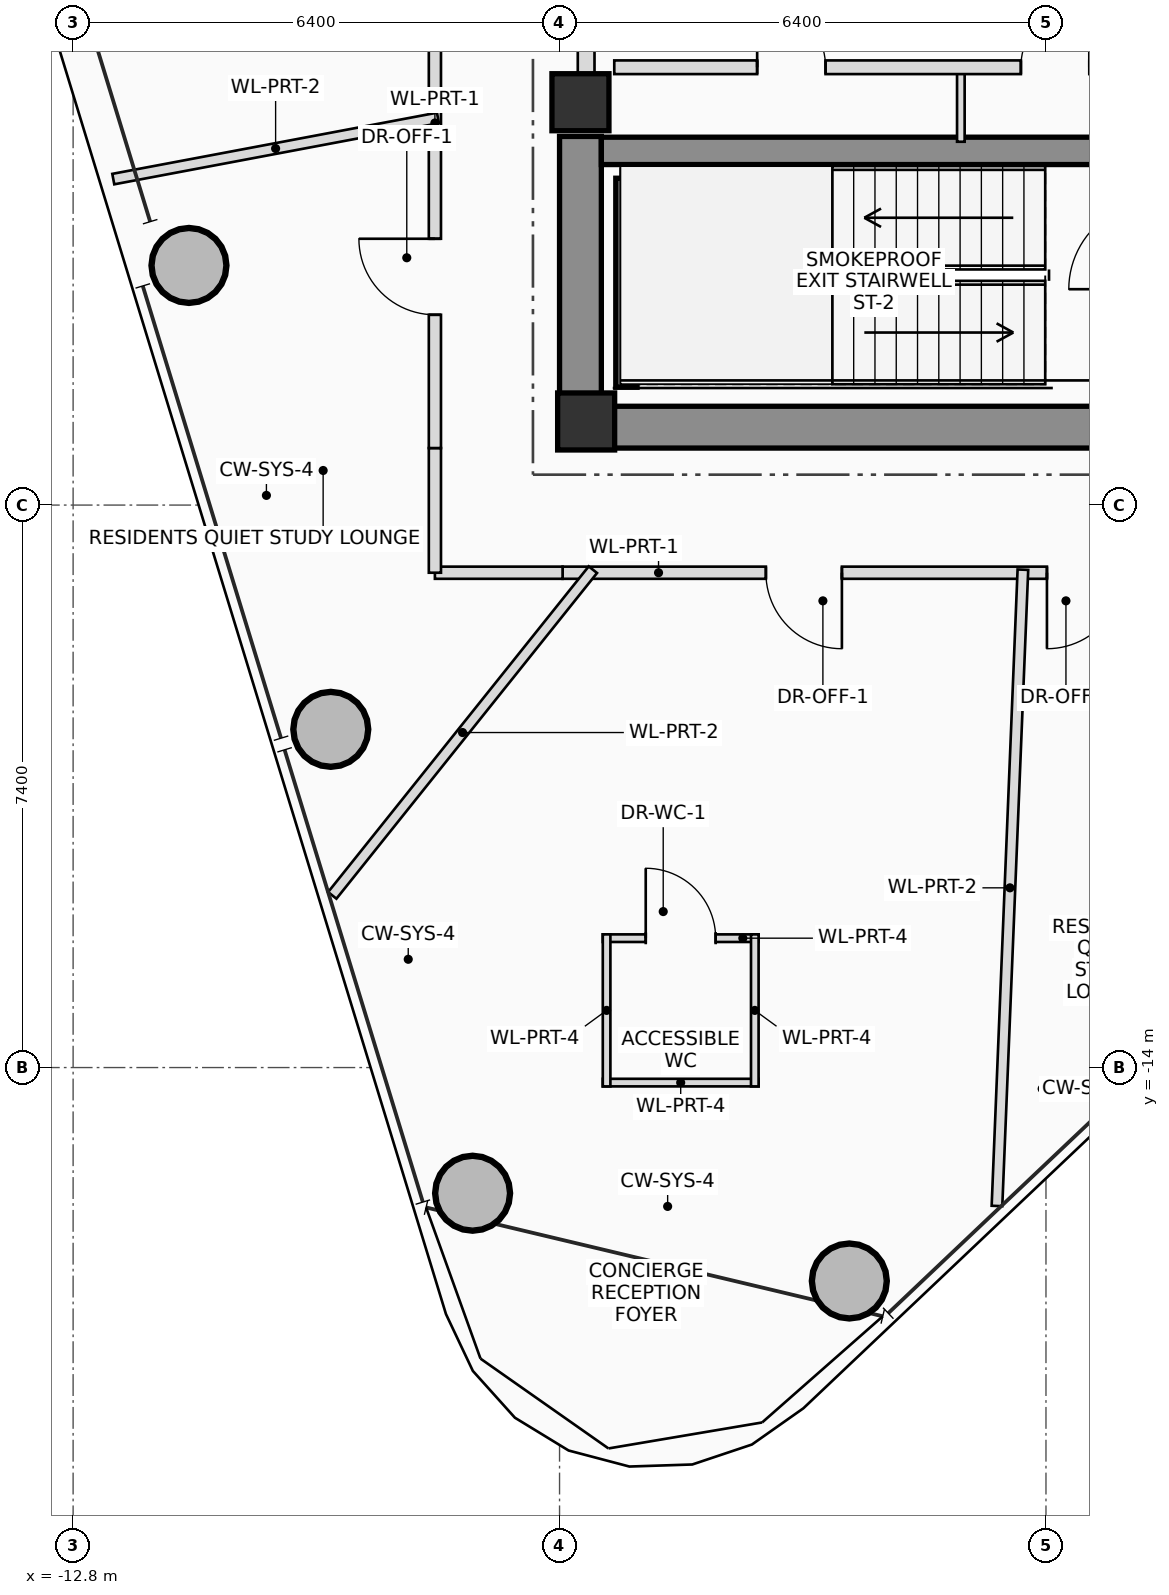
"""IFC4 building model, lengths in metres.
Left out: names, types, materials, properties, quantities, classifications, styles, units other than length and angle.
Written with IfcOpenShell. Run it as: python <this file> out.ifc"""

import sys

from ifc_helpers import new_model, si_unit, direction, frame, frame_2d, origin, origin_2d, place, context, subcontext, project, spatial, rectangle, hollow_circle, extrude, source, transform, mapped, element, fill, save


model = new_model("IFC4")
c1 = context("Model", 3, precision=1e-05, world=origin(), true_north=direction((0.0, 1.0)))
c2 = subcontext(c1, "Body", "Model", "MODEL_VIEW")
j1 = project(units=[si_unit("LENGTHUNIT", "METRE"), si_unit("PLANEANGLEUNIT", "RADIAN")], contexts=[c1])
p1 = place(None, origin())
s1 = spatial("IfcSite", under=j1, at=p1, CompositionType="ELEMENT")
p2 = place(p1, origin())
s2 = spatial("IfcBuilding", under=s1, at=p2, CompositionType="ELEMENT")
p3 = place(p2, frame((0.0, 0.0, 249.05)))
s3 = spatial("IfcBuildingStorey", under=s2, at=p3, CompositionType="ELEMENT", Elevation=249.05)
m1 = source(origin(), c2, "Body", "SweptSolid", [
    extrude(rectangle(XDim=0.75, YDim=0.75, at=origin_2d()), origin(), (0.0, 0.0, 1.0), 3.4),
])
p4 = place(p3, frame((-6.05, -5.5, 0.0), z_axis=(0.0, 0.0, 1.0), x_axis=(1.0, 0.0, 0.0)))
e1 = element("IfcColumn", 1, at=p4, inside=s3, PredefinedType="COLUMN", context=c2, shape_type="MappedRepresentation", body=[
    mapped(m1, transform((0.0, 0.0, 0.0), scale=1.0)),
])
p5 = place(p3, frame((-6.4, -5.575, 0.0), z_axis=(0.0, 0.0, 1.0), x_axis=(1.0, 0.0, 0.0)))
e2 = element("IfcWall", 2, at=p5, inside=s3, PredefinedType="SHEAR", context=c2, shape_type="SweptSolid", body=[
    extrude(rectangle(XDim=12.8, YDim=0.55, at=frame_2d((6.4, 0.0))), origin(), (0.0, 0.0, 1.0), 3.4),
])
p6 = place(p5, frame((8.6, 0.0, 0.0)))
e3 = element("IfcOpeningElement", 3, at=p6, cuts=e2, PredefinedType="OPENING", context=c2, shape_type="SweptSolid", body=[
    extrude(rectangle(XDim=1.2, YDim=2.2, at=frame_2d((0.6, 1.1))), frame((0.0, 0.285, 0.0), z_axis=(0.0, -1.0, 0.0), x_axis=(1.0, 0.0, 0.0)), (0.0, 0.0, 1.0), 0.57),
])
p7 = place(p3, frame((-6.125, -5.3, 0.0), z_axis=(0.0, 0.0, 1.0), x_axis=(0.0, 1.0, 0.0)))
e4 = element("IfcWall", 4, at=p7, inside=s3, PredefinedType="SHEAR", context=c2, shape_type="SweptSolid", body=[
    extrude(rectangle(XDim=3.55, YDim=0.55, at=frame_2d((1.775, 0.0))), origin(), (0.0, 0.0, 1.0), 3.4),
])
p8 = place(p3, frame((-5.85, -1.94, 0.0), z_axis=(0.0, 0.0, 1.0), x_axis=(1.0, 0.0, 0.0)))
e5 = element("IfcWall", 5, at=p8, inside=s3, PredefinedType="SHEAR", context=c2, shape_type="SweptSolid", body=[
    extrude(rectangle(XDim=11.7, YDim=0.36, at=frame_2d((5.85, 0.0))), origin(), (0.0, 0.0, 1.0), 3.4),
])
p9 = place(p3, frame((-5.52, -5.05, 0.0), z_axis=(0.0, 0.0, 1.0), x_axis=(0.0, 1.0, 0.0)))
e6 = element("IfcWall", 6, at=p9, inside=s3, PredefinedType="SHEAR", context=c2, shape_type="SweptSolid", body=[
    extrude(rectangle(XDim=2.75, YDim=0.28, at=frame_2d((1.375, 0.0))), origin(), (0.0, 0.0, 1.0), 3.4),
])
p10 = place(p3, frame((-6.125, -1.3, 0.0), z_axis=(0.0, 0.0, 1.0), x_axis=(1.0, 0.0, 0.0)))
e7 = element("IfcColumn", 7, at=p10, inside=s3, PredefinedType="COLUMN", context=c2, shape_type="MappedRepresentation", body=[
    mapped(m1, transform((0.0, 0.0, 0.0), scale=1.0)),
])
m2 = source(origin(), c2, "Body", "SweptSolid", [
    extrude(hollow_circle(Radius=0.5, WallThickness=0.04, at=origin_2d()), origin(), (0.0, 0.0, 1.0), 3.4),
])
for number, where, z_axis, x_axis in (
    (8, (-2.587, -16.808, 0.0), (0.0, 0.0, 1.0), (1.0, 0.0, 0.0)),
    (9, (-11.276, -3.448, 0.0), (0.0, 0.0, 1.0), (1.0, 0.0, 0.0)),
    (10, (-9.41, -9.55, 0.0), (0.0, 0.0, 1.0), (1.0, 0.0, 0.0)),
    (11, (-7.544, -15.653, 0.0), (0.0, 0.0, 1.0), (1.0, 0.0, 0.0)),
):
    element("IfcColumn", number, at=place(p3, frame(where, z_axis=z_axis, x_axis=x_axis)), inside=s3, PredefinedType="COLUMN", context=c2, shape_type="MappedRepresentation", body=[
        mapped(m2, transform((0.0, 0.0, 0.0), scale=1.0)),
    ])
p11 = place(p3, frame((-6.05, -0.95, 0.0), z_axis=(0.0, 0.0, 1.0), x_axis=(0.0, 1.0, 0.0)))
e12 = element("IfcWall", 12, at=p11, inside=s3, PredefinedType="PLUMBINGWALL", context=c2, shape_type="SweptSolid", body=[
    extrude(rectangle(XDim=1.9, YDim=0.22, at=frame_2d((0.95, 0.0))), origin(), (0.0, 0.0, 1.0), 2.14),
])
p12 = place(p11, frame((0.35, 0.0, 0.0)))
e13 = element("IfcOpeningElement", 13, at=p12, cuts=e12, PredefinedType="OPENING", context=c2, shape_type="SweptSolid", body=[
    extrude(rectangle(XDim=1.2, YDim=2.2, at=frame_2d((0.6, 1.1))), frame((0.0, 0.12, 0.0), z_axis=(0.0, -1.0, 0.0), x_axis=(1.0, 0.0, 0.0)), (0.0, 0.0, 1.0), 0.24),
])
p13 = place(p3, frame((-1.12, -1.82, 0.0), z_axis=(0.0, 0.0, 1.0), x_axis=(0.0, 1.0, 0.0)))
e14 = element("IfcWall", 14, at=p13, inside=s3, PredefinedType="PARTITIONING", context=c2, shape_type="SweptSolid", body=[
    extrude(rectangle(XDim=0.98, YDim=0.1, at=frame_2d((0.49, 0.0))), origin(), (0.0, 0.0, 1.0), 3.16),
])
p14 = place(p3, frame((-5.68, -0.84, 0.0), z_axis=(0.0, 0.0, 1.0), x_axis=(1.0, 0.0, 0.0)))
e15 = element("IfcWall", 15, at=p14, inside=s3, PredefinedType="PLUMBINGWALL", context=c2, shape_type="SweptSolid", body=[
    extrude(rectangle(XDim=11.33, YDim=0.18, at=frame_2d((5.665, 0.0))), origin(), (0.0, 0.0, 1.0), 3.16),
])
p15 = place(p14, frame((1.88, 0.0, 0.0)))
e16 = element("IfcOpeningElement", 16, at=p15, cuts=e15, PredefinedType="OPENING", context=c2, shape_type="SweptSolid", body=[
    extrude(rectangle(XDim=0.9, YDim=2.05, at=frame_2d((0.45, 1.025))), frame((0.0, 0.1, 0.0), z_axis=(0.0, -1.0, 0.0), x_axis=(1.0, 0.0, 0.0)), (0.0, 0.0, 1.0), 0.2),
])
p16 = place(p14, frame((5.35, 0.0, 0.0)))
e17 = element("IfcOpeningElement", 17, at=p16, cuts=e15, PredefinedType="OPENING", context=c2, shape_type="SweptSolid", body=[
    extrude(rectangle(XDim=0.9, YDim=2.05, at=frame_2d((0.45, 1.025))), frame((0.0, 0.1, 0.0), z_axis=(0.0, -1.0, 0.0), x_axis=(1.0, 0.0, 0.0)), (0.0, 0.0, 1.0), 0.2),
])
p17 = place(p14, frame((7.33, 0.0, 0.0)))
e18 = element("IfcOpeningElement", 18, at=p17, cuts=e15, PredefinedType="OPENING", context=c2, shape_type="SweptSolid", body=[
    extrude(rectangle(XDim=1.1, YDim=2.2, at=frame_2d((0.55, 1.1))), frame((0.0, 0.1, 0.0), z_axis=(0.0, -1.0, 0.0), x_axis=(1.0, 0.0, 0.0)), (0.0, 0.0, 1.0), 0.2),
])
p18 = place(p14, frame((8.9, 0.0, 0.0)))
e19 = element("IfcOpeningElement", 19, at=p18, cuts=e15, PredefinedType="OPENING", context=c2, shape_type="SweptSolid", body=[
    extrude(rectangle(XDim=0.9, YDim=2.05, at=frame_2d((0.45, 1.025))), frame((0.0, 0.1, 0.0), z_axis=(0.0, -1.0, 0.0), x_axis=(1.0, 0.0, 0.0)), (0.0, 0.0, 1.0), 0.2),
])
p19 = place(p14, frame((10.25, 0.0, 0.0)))
e20 = element("IfcOpeningElement", 20, at=p19, cuts=e15, PredefinedType="OPENING", context=c2, shape_type="SweptSolid", body=[
    extrude(rectangle(XDim=0.9, YDim=2.05, at=frame_2d((0.45, 1.025))), frame((0.0, 0.1, 0.0), z_axis=(0.0, -1.0, 0.0), x_axis=(1.0, 0.0, 0.0)), (0.0, 0.0, 1.0), 0.2),
])
p20 = place(p3, frame((-5.831, -12.298, 0.0), z_axis=(0.0, 0.0, 1.0), x_axis=(1.0, 0.0, 0.0)))
e21 = element("IfcWall", 21, at=p20, inside=s3, PredefinedType="PARTITIONING", context=c2, shape_type="SweptSolid", body=[
    extrude(rectangle(XDim=2.05, YDim=0.1, at=frame_2d((1.025, 0.0))), origin(), (0.0, 0.0, 1.0), 2.565),
])
p21 = place(p20, frame((0.565, 0.0, 0.0)))
e22 = element("IfcOpeningElement", 22, at=p21, cuts=e21, PredefinedType="OPENING", context=c2, shape_type="SweptSolid", body=[
    extrude(rectangle(XDim=0.92, YDim=2.1, at=frame_2d((0.46, 1.05))), frame((0.0, 0.06, 0.0), z_axis=(0.0, -1.0, 0.0), x_axis=(1.0, 0.0, 0.0)), (0.0, 0.0, 1.0), 0.12),
])
p22 = place(p3, frame((-3.781, -14.198, 0.0), z_axis=(0.0, 0.0, 1.0), x_axis=(-1.0, 0.0, 0.0)))
e23 = element("IfcWall", 23, at=p22, inside=s3, PredefinedType="PARTITIONING", context=c2, shape_type="SweptSolid", body=[
    extrude(rectangle(XDim=2.05, YDim=0.1, at=frame_2d((1.025, 0.0))), origin(), (0.0, 0.0, 1.0), 3.16),
])
p23 = place(p3, frame((-3.831, -12.248, 0.0), z_axis=(0.0, 0.0, 1.0), x_axis=(0.0, -1.0, 0.0)))
e24 = element("IfcWall", 24, at=p23, inside=s3, PredefinedType="PARTITIONING", context=c2, shape_type="SweptSolid", body=[
    extrude(rectangle(XDim=2.0, YDim=0.1, at=frame_2d((1.0, 0.0))), origin(), (0.0, 0.0, 1.0), 2.565),
])
p24 = place(p3, frame((-5.781, -14.248, 0.0), z_axis=(0.0, 0.0, 1.0), x_axis=(0.0, 1.0, 0.0)))
e25 = element("IfcWall", 25, at=p24, inside=s3, PredefinedType="PARTITIONING", context=c2, shape_type="SweptSolid", body=[
    extrude(rectangle(XDim=2.0, YDim=0.1, at=frame_2d((1.0, 0.0))), origin(), (0.0, 0.0, 1.0), 2.815),
])
p25 = place(p3, frame((3.45, -7.49, 0.0), z_axis=(0.0, 0.0, 1.0), x_axis=(-1.0, 0.0, 0.0)))
e26 = element("IfcWall", 26, at=p25, inside=s3, PredefinedType="PARTITIONING", context=c2, shape_type="SweptSolid", body=[
    extrude(rectangle(XDim=9.81, YDim=0.16, at=frame_2d((4.905, 0.0))), origin(), (0.0, 0.0, 1.0), 2.565),
])
p26 = place(p25, frame((2.437, 0.0, 0.0)))
e27 = element("IfcOpeningElement", 27, at=p26, cuts=e26, PredefinedType="OPENING", context=c2, shape_type="SweptSolid", body=[
    extrude(rectangle(XDim=1.0, YDim=2.25, at=frame_2d((0.5, 1.125))), frame((0.0, 0.09, 0.0), z_axis=(0.0, -1.0, 0.0), x_axis=(1.0, 0.0, 0.0)), (0.0, 0.0, 1.0), 0.18),
])
p27 = place(p25, frame((6.135, 0.0, 0.0)))
e28 = element("IfcOpeningElement", 28, at=p27, cuts=e26, PredefinedType="OPENING", context=c2, shape_type="SweptSolid", body=[
    extrude(rectangle(XDim=1.0, YDim=2.25, at=frame_2d((0.5, 1.125))), frame((0.0, 0.09, 0.0), z_axis=(0.0, -1.0, 0.0), x_axis=(1.0, 0.0, 0.0)), (0.0, 0.0, 1.0), 0.18),
])
p28 = place(p3, frame((-6.36, -7.49, 0.0), z_axis=(0.0, 0.0, 1.0), x_axis=(-1.0, 0.0, 0.0)))
e29 = element("IfcWall", 29, at=p28, inside=s3, PredefinedType="PARTITIONING", context=c2, shape_type="SweptSolid", body=[
    extrude(rectangle(XDim=1.68, YDim=0.16, at=frame_2d((0.84, 0.0))), origin(), (0.0, 0.0, 1.0), 2.565),
])
p29 = place(p3, frame((-8.04, -7.49, 0.0), z_axis=(0.0, 0.0, 1.0), x_axis=(0.0, 1.0, 0.0)))
e30 = element("IfcWall", 30, at=p29, inside=s3, PredefinedType="PARTITIONING", context=c2, shape_type="SweptSolid", body=[
    extrude(rectangle(XDim=1.64, YDim=0.16, at=frame_2d((0.82, 0.0))), origin(), (0.0, 0.0, 1.0), 2.765),
])
p30 = place(p3, frame((-8.04, -5.85, 0.0), z_axis=(0.0, 0.0, 1.0), x_axis=(0.0, 1.0, 0.0)))
e31 = element("IfcWall", 31, at=p30, inside=s3, PredefinedType="PARTITIONING", context=c2, shape_type="SweptSolid", body=[
    extrude(rectangle(XDim=11.7, YDim=0.16, at=frame_2d((5.85, 0.0))), origin(), (0.0, 0.0, 1.0), 2.565),
])
p31 = place(p30, frame((1.754, 0.0, 0.0)))
e32 = element("IfcOpeningElement", 32, at=p31, cuts=e31, PredefinedType="OPENING", context=c2, shape_type="SweptSolid", body=[
    extrude(rectangle(XDim=1.0, YDim=2.25, at=frame_2d((0.5, 1.125))), frame((0.0, 0.09, 0.0), z_axis=(0.0, -1.0, 0.0), x_axis=(1.0, 0.0, 0.0)), (0.0, 0.0, 1.0), 0.18),
])
p32 = place(p30, frame((5.8, 0.0, 0.0)))
e33 = element("IfcOpeningElement", 33, at=p32, cuts=e31, PredefinedType="OPENING", context=c2, shape_type="SweptSolid", body=[
    extrude(rectangle(XDim=1.0, YDim=2.25, at=frame_2d((0.5, 1.125))), frame((0.0, 0.09, 0.0), z_axis=(0.0, -1.0, 0.0), x_axis=(1.0, 0.0, 0.0)), (0.0, 0.0, 1.0), 0.18),
])
p33 = place(p30, frame((9.103, 0.0, 0.0)))
e34 = element("IfcOpeningElement", 34, at=p33, cuts=e31, PredefinedType="OPENING", context=c2, shape_type="SweptSolid", body=[
    extrude(rectangle(XDim=1.0, YDim=2.25, at=frame_2d((0.5, 1.125))), frame((0.0, 0.09, 0.0), z_axis=(0.0, -1.0, 0.0), x_axis=(1.0, 0.0, 0.0)), (0.0, 0.0, 1.0), 0.18),
])
p34 = place(p3, frame((-8.0, -1.507, 0.0), z_axis=(0.0, 0.0, 1.0), x_axis=(-0.982724350189, -0.185075259138, 0.0)))
e35 = element("IfcWall", 35, at=p34, inside=s3, PredefinedType="PARTITIONING", context=c2, shape_type="SweptSolid", body=[
    extrude(rectangle(XDim=4.347, YDim=0.14, at=frame_2d((2.173, 0.0))), origin(), (0.0, 0.0, 1.0), 2.725),
])
p35 = place(p3, frame((-5.961, -7.45, 0.0), z_axis=(0.0, 0.0, 1.0), x_axis=(-0.624787267525, -0.780795024535, 0.0)))
e36 = element("IfcWall", 36, at=p35, inside=s3, PredefinedType="PARTITIONING", context=c2, shape_type="SweptSolid", body=[
    extrude(rectangle(XDim=5.488, YDim=0.14, at=frame_2d((2.744, 0.0))), origin(), (0.0, 0.0, 1.0), 2.565),
])
p36 = place(p3, frame((-0.304, -7.45, 0.0), z_axis=(0.0, 0.0, 1.0), x_axis=(-0.04070934235, -0.999171031128, 0.0)))
e37 = element("IfcWall", 37, at=p36, inside=s3, PredefinedType="PARTITIONING", context=c2, shape_type="SweptSolid", body=[
    extrude(rectangle(XDim=8.378, YDim=0.14, at=frame_2d((4.189, 0.0))), origin(), (0.0, 0.0, 1.0), 2.725),
])
p37 = place(p15, origin())
e38 = element("IfcDoor", 38, at=p37, inside=s3, OperationType="SINGLE_SWING_LEFT", PredefinedType="DOOR", context=c2, shape_type="SweptSolid", body=[
    extrude(rectangle(XDim=0.9, YDim=2.05, at=frame_2d((0.45, 1.025))), frame((0.0, 0.025, 0.0), z_axis=(0.0, -1.0, 0.0), x_axis=(1.0, 0.0, 0.0)), (0.0, 0.0, 1.0), 0.05),
])
fill(e16, e38)
p38 = place(p16, origin())
e39 = element("IfcDoor", 39, at=p38, inside=s3, OperationType="SINGLE_SWING_RIGHT", PredefinedType="DOOR", context=c2, shape_type="SweptSolid", body=[
    extrude(rectangle(XDim=0.9, YDim=2.05, at=frame_2d((0.45, 1.025))), frame((0.0, 0.025, 0.0), z_axis=(0.0, -1.0, 0.0), x_axis=(1.0, 0.0, 0.0)), (0.0, 0.0, 1.0), 0.05),
])
fill(e17, e39)
p39 = place(p21, origin())
e40 = element("IfcDoor", 40, at=p39, inside=s3, OperationType="SINGLE_SWING_LEFT", PredefinedType="DOOR", context=c2, shape_type="SweptSolid", body=[
    extrude(rectangle(XDim=0.92, YDim=2.1, at=frame_2d((0.46, 1.05))), frame((0.0, 0.025, 0.0), z_axis=(0.0, -1.0, 0.0), x_axis=(1.0, 0.0, 0.0)), (0.0, 0.0, 1.0), 0.05),
])
fill(e22, e40)
p40 = place(p26, origin())
e41 = element("IfcDoor", 41, at=p40, inside=s3, OperationType="SINGLE_SWING_RIGHT", PredefinedType="DOOR", context=c2, shape_type="SweptSolid", body=[
    extrude(rectangle(XDim=1.0, YDim=2.25, at=frame_2d((0.5, 1.125))), frame((0.0, 0.025, 0.0), z_axis=(0.0, -1.0, 0.0), x_axis=(1.0, 0.0, 0.0)), (0.0, 0.0, 1.0), 0.05),
])
fill(e27, e41)
p41 = place(p27, origin())
e42 = element("IfcDoor", 42, at=p41, inside=s3, OperationType="SINGLE_SWING_LEFT", PredefinedType="DOOR", context=c2, shape_type="SweptSolid", body=[
    extrude(rectangle(XDim=1.0, YDim=2.25, at=frame_2d((0.5, 1.125))), frame((0.0, 0.025, 0.0), z_axis=(0.0, -1.0, 0.0), x_axis=(1.0, 0.0, 0.0)), (0.0, 0.0, 1.0), 0.05),
])
fill(e28, e42)
p42 = place(p31, origin())
e43 = element("IfcDoor", 43, at=p42, inside=s3, OperationType="SINGLE_SWING_RIGHT", PredefinedType="DOOR", context=c2, shape_type="SweptSolid", body=[
    extrude(rectangle(XDim=1.0, YDim=2.25, at=frame_2d((0.5, 1.125))), frame((0.0, 0.025, 0.0), z_axis=(0.0, -1.0, 0.0), x_axis=(1.0, 0.0, 0.0)), (0.0, 0.0, 1.0), 0.05),
])
fill(e32, e43)
save(model, sys.argv[1])
